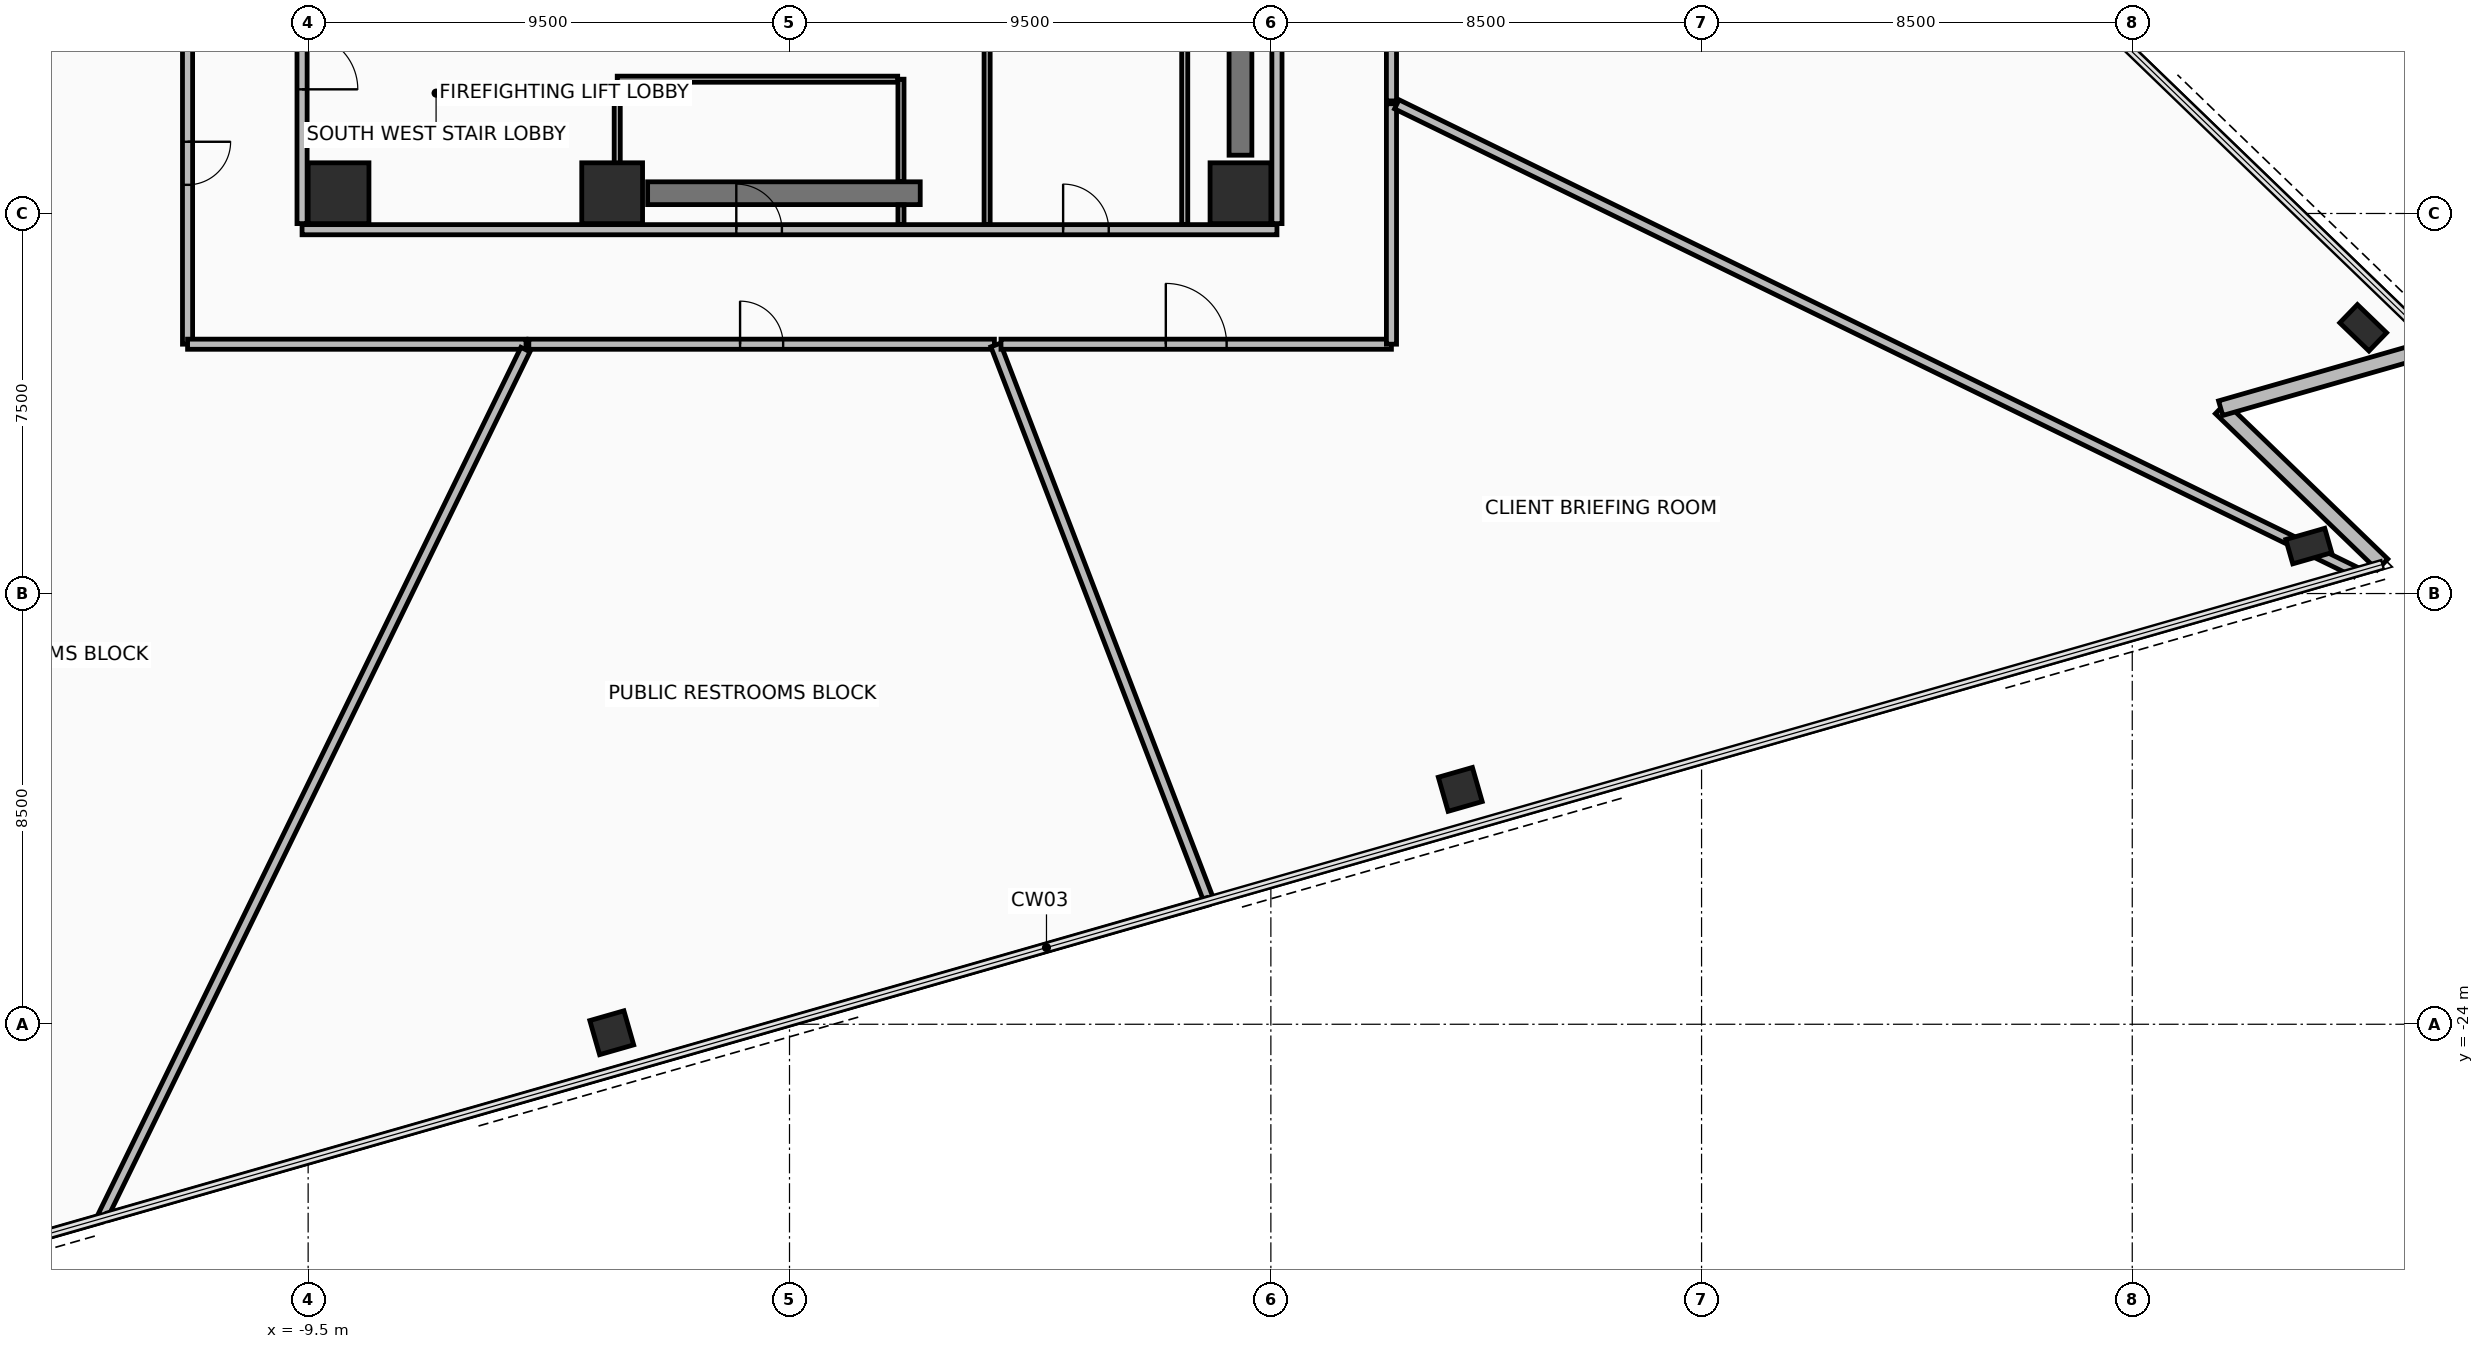
"""IFC4 building model, lengths in metres.
Left out: names, types, materials, properties, quantities, classifications, styles, units other than length and angle.
Written with IfcOpenShell. Run it as: python <this file> out.ifc"""

import sys

from ifc_helpers import new_model, si_unit, direction, frame, frame_2d, origin, origin_2d, place, context, subcontext, project, spatial, rectangle, hollow_rectangle, extrude, element, fill, save


model = new_model("IFC4")
c1 = context("Model", 3, precision=1e-05, world=origin(), true_north=direction((0.0, 1.0)))
c2 = subcontext(c1, "Body", "Model", "MODEL_VIEW")
j1 = project(units=[si_unit("LENGTHUNIT", "METRE"), si_unit("PLANEANGLEUNIT", "RADIAN")], contexts=[c1])
p1 = place(None, origin())
s1 = spatial("IfcSite", under=j1, at=p1, CompositionType="ELEMENT")
p2 = place(p1, origin())
s2 = spatial("IfcBuilding", under=s1, at=p2, CompositionType="ELEMENT")
p3 = place(p2, frame((0.0, 0.0, 93.3)))
s3 = spatial("IfcBuildingStorey", under=s2, at=p3, CompositionType="ELEMENT", Elevation=93.3)
for number, where, z_axis, x_axis in (
    (1, (-8.9, -7.6, 0.0), (0.0, 0.0, 1.0), (1.0, 0.0, 0.0)),
    (2, (-3.5, -7.6, 0.0), (0.0, 0.0, 1.0), (1.0, 0.0, 0.0)),
    (3, (8.9, -7.6, 0.0), (0.0, 0.0, 1.0), (1.0, 0.0, 0.0)),
):
    element("IfcColumn", number, at=place(p3, frame(where, z_axis=z_axis, x_axis=x_axis)), inside=s3, PredefinedType="COLUMN", context=c2, shape_type="SweptSolid", body=[
        extrude(rectangle(XDim=1.2, YDim=1.2, at=origin_2d()), origin(), (0.0, 0.0, 1.0), 3.6),
    ])
for number, where, z_axis, x_axis in (
    (4, (-3.508, -24.167, 0.0), (0.0, 0.0, 1.0), (0.961, 0.276, 0.0)),
    (5, (13.238, -19.365, 0.0), (0.0, 0.0, 1.0), (0.961, 0.276, 0.0)),
):
    element("IfcColumn", number, at=place(p3, frame(where, z_axis=z_axis, x_axis=x_axis)), inside=s3, PredefinedType="COLUMN", context=c2, shape_type="SweptSolid", body=[
        extrude(hollow_rectangle(XDim=0.7, YDim=0.7, WallThickness=0.04, at=origin_2d()), origin(), (0.0, 0.0, 1.0), 3.6),
    ])
for number, where, z_axis, x_axis in (
    (6, (29.983, -14.564, 0.0), (0.0, 0.0, 1.0), (0.961, 0.276, 0.0)),
    (7, (31.058, -10.256, 0.0), (0.0, 0.0, 1.0), (-0.719, 0.695, 0.0)),
):
    element("IfcColumn", number, at=place(p3, frame(where, z_axis=z_axis, x_axis=x_axis)), inside=s3, PredefinedType="COLUMN", context=c2, shape_type="SweptSolid", body=[
        extrude(hollow_rectangle(XDim=0.5, YDim=0.8, WallThickness=0.04, at=origin_2d()), origin(), (0.0, 0.0, 1.0), 3.6),
    ])
p4 = place(p3, frame((31.439, -14.927, 0.0), z_axis=(0.0, 0.0, 1.0), x_axis=(-0.719317126864, 0.694681848763, 0.0)))
e8 = element("IfcWall", 8, at=p4, inside=s3, PredefinedType="STANDARD", context=c2, shape_type="SweptSolid", body=[
    extrude(rectangle(XDim=4.44, YDim=0.3, at=frame_2d((2.22, 0.0))), origin(), (0.0, 0.0, 1.0), 2.605),
])
p5 = place(p3, frame((28.245, -11.842, 0.0), z_axis=(0.0, 0.0, 1.0), x_axis=(0.961255810825, 0.275657878821, 0.0)))
e9 = element("IfcWall", 9, at=p5, inside=s3, PredefinedType="STANDARD", context=c2, shape_type="SweptSolid", body=[
    extrude(rectangle(XDim=4.44, YDim=0.3, at=frame_2d((2.22, 0.0))), origin(), (0.0, 0.0, 1.0), 2.605),
])
p6 = place(p3, frame((-2.8, -7.6, 0.0), z_axis=(0.0, 0.0, 1.0), x_axis=(1.0, 0.0, 0.0)))
e10 = element("IfcWall", 10, at=p6, inside=s3, PredefinedType="SHEAR", context=c2, shape_type="SweptSolid", body=[
    extrude(rectangle(XDim=5.38, YDim=0.45, at=frame_2d((2.69, 0.0))), origin(), (0.0, 0.0, 1.0), 3.41),
])
p7 = place(p3, frame((8.9, -6.85, 0.0), z_axis=(0.0, 0.0, 1.0), x_axis=(0.0, 1.0, 0.0)))
e11 = element("IfcWall", 11, at=p7, inside=s3, PredefinedType="SHEAR", context=c2, shape_type="SweptSolid", body=[
    extrude(rectangle(XDim=10.7, YDim=0.45, at=frame_2d((5.35, 0.0))), origin(), (0.0, 0.0, 1.0), 3.41),
])
p8 = place(p3, frame((-9.62, -8.32, 0.0), z_axis=(0.0, 0.0, 1.0), x_axis=(1.0, 0.0, 0.0)))
e12 = element("IfcWall", 12, at=p8, inside=s3, PredefinedType="PARTITIONING", context=c2, shape_type="SweptSolid", body=[
    extrude(rectangle(XDim=19.24, YDim=0.2, at=frame_2d((9.62, 0.0))), origin(), (0.0, 0.0, 1.0), 2.805),
])
p9 = place(p8, frame((8.57, 0.0, 0.0)))
e13 = element("IfcOpeningElement", 13, at=p9, cuts=e12, PredefinedType="OPENING", context=c2, shape_type="SweptSolid", body=[
    extrude(rectangle(XDim=0.9, YDim=2.1, at=frame_2d((0.45, 1.05))), frame((0.0, 0.11, 0.0), z_axis=(0.0, -1.0, 0.0), x_axis=(1.0, 0.0, 0.0)), (0.0, 0.0, 1.0), 0.22),
])
p10 = place(p8, frame((15.02, 0.0, 0.0)))
e14 = element("IfcOpeningElement", 14, at=p10, cuts=e12, PredefinedType="OPENING", context=c2, shape_type="SweptSolid", body=[
    extrude(rectangle(XDim=0.9, YDim=2.1, at=frame_2d((0.45, 1.05))), frame((0.0, 0.11, 0.0), z_axis=(0.0, -1.0, 0.0), x_axis=(1.0, 0.0, 0.0)), (0.0, 0.0, 1.0), 0.22),
])
p11 = place(p3, frame((-9.62, 8.2, 0.0), z_axis=(0.0, 0.0, 1.0), x_axis=(0.0, -1.0, 0.0)))
e15 = element("IfcWall", 15, at=p11, inside=s3, PredefinedType="PARTITIONING", context=c2, shape_type="SweptSolid", body=[
    extrude(rectangle(XDim=16.4, YDim=0.2, at=frame_2d((8.2, 0.0))), origin(), (0.0, 0.0, 1.0), 2.805),
])
p12 = place(p11, frame((12.65, 0.0, 0.0)))
e16 = element("IfcOpeningElement", 16, at=p12, cuts=e15, PredefinedType="OPENING", context=c2, shape_type="SweptSolid", body=[
    extrude(rectangle(XDim=1.1, YDim=2.15, at=frame_2d((0.55, 1.075))), frame((0.0, 0.11, 0.0), z_axis=(0.0, -1.0, 0.0), x_axis=(1.0, 0.0, 0.0)), (0.0, 0.0, 1.0), 0.22),
])
p13 = place(p3, frame((9.62, -8.2, 0.0), z_axis=(0.0, 0.0, 1.0), x_axis=(0.0, 1.0, 0.0)))
e17 = element("IfcWall", 17, at=p13, inside=s3, PredefinedType="PARTITIONING", context=c2, shape_type="SweptSolid", body=[
    extrude(rectangle(XDim=16.4, YDim=0.2, at=frame_2d((8.2, 0.0))), origin(), (0.0, 0.0, 1.0), 2.805),
])
p14 = place(p13, frame((12.65, 0.0, 0.0)))
e18 = element("IfcOpeningElement", 18, at=p14, cuts=e17, PredefinedType="OPENING", context=c2, shape_type="SweptSolid", body=[
    extrude(rectangle(XDim=1.1, YDim=2.15, at=frame_2d((0.55, 1.075))), frame((0.0, 0.11, 0.0), z_axis=(0.0, -1.0, 0.0), x_axis=(1.0, 0.0, 0.0)), (0.0, 0.0, 1.0), 0.22),
])
p15 = place(p3, frame((2.2, -8.215, 0.0), z_axis=(0.0, 0.0, 1.0), x_axis=(0.0, 1.0, 0.0)))
e19 = element("IfcWall", 19, at=p15, inside=s3, PredefinedType="PARTITIONING", context=c2, shape_type="SweptSolid", body=[
    extrude(rectangle(XDim=0.385, YDim=0.12, at=frame_2d((0.192, 0.0))), origin(), (0.0, 0.0, 1.0), 2.605),
])
p16 = place(p3, frame((2.2, -7.37, 0.0), z_axis=(0.0, 0.0, 1.0), x_axis=(0.0, 1.0, 0.0)))
e20 = element("IfcWall", 20, at=p16, inside=s3, PredefinedType="PARTITIONING", context=c2, shape_type="SweptSolid", body=[
    extrude(rectangle(XDim=2.02, YDim=0.12, at=frame_2d((1.01, 0.0))), origin(), (0.0, 0.0, 1.0), 2.605),
])
p17 = place(p3, frame((2.135, -5.35, 0.0), z_axis=(0.0, 0.0, 1.0), x_axis=(-1.0, 0.0, 0.0)))
e21 = element("IfcWall", 21, at=p17, inside=s3, PredefinedType="PARTITIONING", context=c2, shape_type="SweptSolid", body=[
    extrude(rectangle(XDim=5.535, YDim=0.12, at=frame_2d((2.768, 0.0))), origin(), (0.0, 0.0, 1.0), 2.605),
])
p18 = place(p3, frame((-3.4, -5.415, 0.0), z_axis=(0.0, 0.0, 1.0), x_axis=(0.0, -1.0, 0.0)))
e22 = element("IfcWall", 22, at=p18, inside=s3, PredefinedType="PARTITIONING", context=c2, shape_type="SweptSolid", body=[
    extrude(rectangle(XDim=2.8, YDim=0.12, at=frame_2d((1.4, 0.0))), origin(), (0.0, 0.0, 1.0), 2.605),
])
p19 = place(p3, frame((7.8, -8.215, 0.0), z_axis=(0.0, 0.0, 1.0), x_axis=(0.0, 1.0, 0.0)))
e23 = element("IfcWall", 23, at=p19, inside=s3, PredefinedType="PARTITIONING", context=c2, shape_type="SweptSolid", body=[
    extrude(rectangle(XDim=4.015, YDim=0.12, at=frame_2d((2.008, 0.0))), origin(), (0.0, 0.0, 1.0), 2.605),
])
p20 = place(p3, frame((3.9, -4.265, 0.0), z_axis=(0.0, 0.0, 1.0), x_axis=(0.0, -1.0, 0.0)))
e24 = element("IfcWall", 24, at=p20, inside=s3, PredefinedType="PARTITIONING", context=c2, shape_type="SweptSolid", body=[
    extrude(rectangle(XDim=3.95, YDim=0.12, at=frame_2d((1.975, 0.0))), origin(), (0.0, 0.0, 1.0), 2.605),
])
p21 = place(p3, frame((-19.121, -5.483, 0.0), z_axis=(0.0, 0.0, 1.0), x_axis=(0.961259375601, 0.275645447665, 0.0)))
e25 = element("IfcWall", 25, at=p21, inside=s3, PredefinedType="PARTITIONING", context=c2, shape_type="SweptSolid", body=[
    extrude(rectangle(XDim=7.499, YDim=0.2, at=frame_2d((3.75, 0.0))), origin(), (0.0, 0.0, 1.0), 2.605),
])
p22 = place(p3, frame((-11.88, -3.44, 0.0), z_axis=(0.0, 0.0, 1.0), x_axis=(0.0, -1.0, 0.0)))
e26 = element("IfcWall", 26, at=p22, inside=s3, PredefinedType="PARTITIONING", context=c2, shape_type="SweptSolid", body=[
    extrude(rectangle(XDim=7.14, YDim=0.2, at=frame_2d((3.57, 0.0))), origin(), (0.0, 0.0, 1.0), 2.805),
])
p23 = place(p22, frame((3.145, 0.0, 0.0)))
e27 = element("IfcOpeningElement", 27, at=p23, cuts=e26, PredefinedType="OPENING", context=c2, shape_type="SweptSolid", body=[
    extrude(rectangle(XDim=0.85, YDim=2.1, at=frame_2d((0.425, 1.05))), frame((0.0, 0.11, 0.0), z_axis=(0.0, -1.0, 0.0), x_axis=(1.0, 0.0, 0.0)), (0.0, 0.0, 1.0), 0.22),
])
p24 = place(p3, frame((-11.879, -10.58, 0.0), z_axis=(0.0, 0.0, 1.0), x_axis=(1.0, 0.0, 0.0)))
e28 = element("IfcWall", 28, at=p24, inside=s3, PredefinedType="PARTITIONING", context=c2, shape_type="SweptSolid", body=[
    extrude(rectangle(XDim=6.679, YDim=0.2, at=frame_2d((3.34, 0.0))), origin(), (0.0, 0.0, 1.0), 2.805),
])
p25 = place(p3, frame((-5.211, -10.685, 0.0), z_axis=(0.0, 0.0, 1.0), x_axis=(-0.438373182397, -0.898793053464, 0.0)))
e29 = element("IfcWall", 29, at=p25, inside=s3, PredefinedType="PARTITIONING", context=c2, shape_type="SweptSolid", body=[
    extrude(rectangle(XDim=19.069, YDim=0.2, at=frame_2d((9.535, 0.0))), origin(), (0.0, 0.0, 1.0), 2.605),
])
p26 = place(p3, frame((-13.586, -27.837, 0.0), z_axis=(0.0, 0.0, 1.0), x_axis=(-0.961259140901, -0.275646266135, 0.0)))
e30 = element("IfcWall", 30, at=p26, inside=s3, PredefinedType="PARTITIONING", context=c2, shape_type="SweptSolid", body=[
    extrude(rectangle(XDim=7.841, YDim=0.15, at=frame_2d((3.92, 0.0))), origin(), (0.0, 0.0, 1.0), 3.41),
])
p27 = place(p3, frame((-5.145, -10.58, 0.0), z_axis=(0.0, 0.0, 1.0), x_axis=(1.0, 0.0, 0.0)))
e31 = element("IfcWall", 31, at=p27, inside=s3, PredefinedType="PARTITIONING", context=c2, shape_type="SweptSolid", body=[
    extrude(rectangle(XDim=9.189, YDim=0.2, at=frame_2d((4.594, 0.0))), origin(), (0.0, 0.0, 1.0), 2.805),
])
p28 = place(p27, frame((4.169, 0.0, 0.0)))
e32 = element("IfcOpeningElement", 32, at=p28, cuts=e31, PredefinedType="OPENING", context=c2, shape_type="SweptSolid", body=[
    extrude(rectangle(XDim=0.85, YDim=2.1, at=frame_2d((0.425, 1.05))), frame((0.0, 0.11, 0.0), z_axis=(0.0, -1.0, 0.0), x_axis=(1.0, 0.0, 0.0)), (0.0, 0.0, 1.0), 0.22),
])
p29 = place(p3, frame((4.067, -10.596, 0.0), z_axis=(0.0, 0.0, 1.0), x_axis=(0.358376224971, -0.933577249817, 0.0)))
e33 = element("IfcWall", 33, at=p29, inside=s3, PredefinedType="PARTITIONING", context=c2, shape_type="SweptSolid", body=[
    extrude(rectangle(XDim=11.725, YDim=0.2, at=frame_2d((5.862, 0.0))), origin(), (0.0, 0.0, 1.0), 2.605),
])
p30 = place(p3, frame((8.253, -21.575, 0.0), z_axis=(0.0, 0.0, 1.0), x_axis=(-0.961261412197, -0.275638345338, 0.0)))
e34 = element("IfcWall", 34, at=p30, inside=s3, PredefinedType="PARTITIONING", context=c2, shape_type="SweptSolid", body=[
    extrude(rectangle(XDim=22.567, YDim=0.15, at=frame_2d((11.283, 0.0))), origin(), (0.0, 0.0, 1.0), 3.41),
])
p31 = place(p3, frame((4.174, -10.58, 0.0), z_axis=(0.0, 0.0, 1.0), x_axis=(1.0, 0.0, 0.0)))
e35 = element("IfcWall", 35, at=p31, inside=s3, PredefinedType="PARTITIONING", context=c2, shape_type="SweptSolid", body=[
    extrude(rectangle(XDim=7.706, YDim=0.2, at=frame_2d((3.853, 0.0))), origin(), (0.0, 0.0, 1.0), 2.805),
])
p32 = place(p31, frame((3.253, 0.0, 0.0)))
e36 = element("IfcOpeningElement", 36, at=p32, cuts=e35, PredefinedType="OPENING", context=c2, shape_type="SweptSolid", body=[
    extrude(rectangle(XDim=1.2, YDim=2.15, at=frame_2d((0.6, 1.075))), frame((0.0, 0.11, 0.0), z_axis=(0.0, -1.0, 0.0), x_axis=(1.0, 0.0, 0.0)), (0.0, 0.0, 1.0), 0.22),
])
p33 = place(p3, frame((11.88, -10.579, 0.0), z_axis=(0.0, 0.0, 1.0), x_axis=(0.0, 1.0, 0.0)))
e37 = element("IfcWall", 37, at=p33, inside=s3, PredefinedType="PARTITIONING", context=c2, shape_type="SweptSolid", body=[
    extrude(rectangle(XDim=4.745, YDim=0.2, at=frame_2d((2.373, 0.0))), origin(), (0.0, 0.0, 1.0), 2.805),
])
p34 = place(p3, frame((11.985, -5.845, 0.0), z_axis=(0.0, 0.0, 1.0), x_axis=(0.898791396377, -0.438376579894, 0.0)))
e38 = element("IfcWall", 38, at=p34, inside=s3, PredefinedType="PARTITIONING", context=c2, shape_type="SweptSolid", body=[
    extrude(rectangle(XDim=21.059, YDim=0.2, at=frame_2d((10.53, 0.0))), origin(), (0.0, 0.0, 1.0), 2.605),
])
p35 = place(p3, frame((11.88, -5.779, 0.0), z_axis=(0.0, 0.0, 1.0), x_axis=(0.0, 1.0, 0.0)))
e39 = element("IfcWall", 39, at=p35, inside=s3, PredefinedType="PARTITIONING", context=c2, shape_type="SweptSolid", body=[
    extrude(rectangle(XDim=9.166, YDim=0.2, at=frame_2d((4.583, 0.0))), origin(), (0.0, 0.0, 1.0), 3.41),
])
p36 = place(p35, frame((4.133, 0.0, 0.0)))
e40 = element("IfcOpeningElement", 40, at=p36, cuts=e39, PredefinedType="OPENING", context=c2, shape_type="SweptSolid", body=[
    extrude(rectangle(XDim=0.9, YDim=2.1, at=frame_2d((0.45, 1.05))), frame((0.0, 0.11, 0.0), z_axis=(0.0, -1.0, 0.0), x_axis=(1.0, 0.0, 0.0)), (0.0, 0.0, 1.0), 0.22),
])
p37 = place(p12, frame((1.1, 0.0, 0.0), z_axis=(0.0, 0.0, 1.0), x_axis=(-1.0, 0.0, 0.0)))
e41 = element("IfcDoor", 41, at=p37, inside=s3, OperationType="SINGLE_SWING_LEFT", PredefinedType="DOOR", context=c2, shape_type="SweptSolid", body=[
    extrude(rectangle(XDim=1.1, YDim=2.15, at=frame_2d((0.55, 1.075))), frame((0.0, 0.025, 0.0), z_axis=(0.0, -1.0, 0.0), x_axis=(1.0, 0.0, 0.0)), (0.0, 0.0, 1.0), 0.05),
])
fill(e16, e41)
p38 = place(p9, origin())
e42 = element("IfcDoor", 42, at=p38, inside=s3, OperationType="SINGLE_SWING_LEFT", PredefinedType="DOOR", context=c2, shape_type="SweptSolid", body=[
    extrude(rectangle(XDim=0.9, YDim=2.1, at=frame_2d((0.45, 1.05))), frame((0.0, 0.025, 0.0), z_axis=(0.0, -1.0, 0.0), x_axis=(1.0, 0.0, 0.0)), (0.0, 0.0, 1.0), 0.05),
])
fill(e13, e42)
p39 = place(p10, origin())
e43 = element("IfcDoor", 43, at=p39, inside=s3, OperationType="SINGLE_SWING_LEFT", PredefinedType="DOOR", context=c2, shape_type="SweptSolid", body=[
    extrude(rectangle(XDim=0.9, YDim=2.1, at=frame_2d((0.45, 1.05))), frame((0.0, 0.025, 0.0), z_axis=(0.0, -1.0, 0.0), x_axis=(1.0, 0.0, 0.0)), (0.0, 0.0, 1.0), 0.05),
])
fill(e14, e43)
p40 = place(p23, origin())
e44 = element("IfcDoor", 44, at=p40, inside=s3, OperationType="SINGLE_SWING_RIGHT", PredefinedType="DOOR", context=c2, shape_type="SweptSolid", body=[
    extrude(rectangle(XDim=0.85, YDim=2.1, at=frame_2d((0.425, 1.05))), frame((0.0, 0.025, 0.0), z_axis=(0.0, -1.0, 0.0), x_axis=(1.0, 0.0, 0.0)), (0.0, 0.0, 1.0), 0.05),
])
fill(e27, e44)
p41 = place(p28, origin())
e45 = element("IfcDoor", 45, at=p41, inside=s3, OperationType="SINGLE_SWING_RIGHT", PredefinedType="DOOR", context=c2, shape_type="SweptSolid", body=[
    extrude(rectangle(XDim=0.85, YDim=2.1, at=frame_2d((0.425, 1.05))), frame((0.0, 0.025, 0.0), z_axis=(0.0, -1.0, 0.0), x_axis=(1.0, 0.0, 0.0)), (0.0, 0.0, 1.0), 0.05),
])
fill(e32, e45)
p42 = place(p32, origin())
e46 = element("IfcDoor", 46, at=p42, inside=s3, OperationType="SINGLE_SWING_LEFT", PredefinedType="DOOR", context=c2, shape_type="SweptSolid", body=[
    extrude(rectangle(XDim=1.2, YDim=2.15, at=frame_2d((0.6, 1.075))), frame((0.0, 0.025, 0.0), z_axis=(0.0, -1.0, 0.0), x_axis=(1.0, 0.0, 0.0)), (0.0, 0.0, 1.0), 0.05),
])
fill(e36, e46)
save(model, sys.argv[1])
